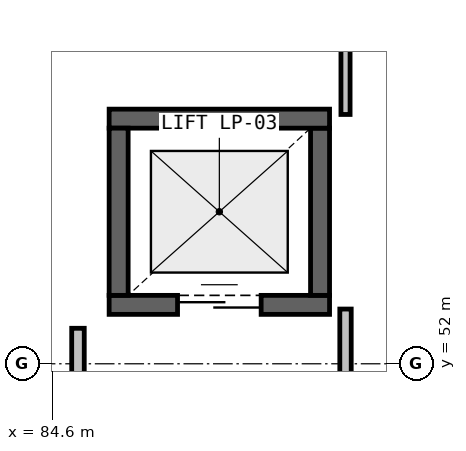
"""IFC4 building model, lengths in metres.
Left out: names, types, materials, properties, quantities, classifications, styles, units other than length and angle.
Written with IfcOpenShell. Run it as: python <this file> out.ifc"""

import sys

from ifc_helpers import new_model, si_unit, direction, frame, frame_2d, origin, place, context, subcontext, project, spatial, rectangle, extrude, element, fill, save


model = new_model("IFC4")
c1 = context("Model", 3, precision=1e-05, world=origin(), true_north=direction((0.0, 1.0)))
c2 = subcontext(c1, "Body", "Model", "MODEL_VIEW")
j1 = project(units=[si_unit("LENGTHUNIT", "METRE"), si_unit("PLANEANGLEUNIT", "RADIAN")], contexts=[c1])
p1 = place(None, origin())
s1 = spatial("IfcSite", under=j1, at=p1, CompositionType="ELEMENT")
p2 = place(p1, origin())
s2 = spatial("IfcBuilding", under=s1, at=p2, CompositionType="ELEMENT")
p3 = place(p2, frame((0.0, 0.0, 5.4)))
s3 = spatial("IfcBuildingStorey", under=s2, at=p3, CompositionType="ELEMENT", Elevation=5.4)
p4 = place(p3, frame((85.35, 52.775, 0.0), z_axis=(0.0, 0.0, 1.0), x_axis=(1.0, 0.0, 0.0)))
e1 = element("IfcWall", 1, at=p4, inside=s3, PredefinedType="SHEAR", context=c2, shape_type="SweptSolid", body=[
    extrude(rectangle(XDim=2.9, YDim=0.25, at=frame_2d((1.45, 0.0))), origin(), (0.0, 0.0, 1.0), 4.445),
])
p5 = place(p4, frame((0.9, 0.0, 0.0)))
e2 = element("IfcOpeningElement", 2, at=p5, cuts=e1, PredefinedType="OPENING", context=c2, shape_type="SweptSolid", body=[
    extrude(rectangle(XDim=1.1, YDim=2.15, at=frame_2d((0.55, 1.075))), frame((0.0, 0.135, 0.0), z_axis=(0.0, -1.0, 0.0), x_axis=(1.0, 0.0, 0.0)), (0.0, 0.0, 1.0), 0.27),
])
p6 = place(p3, frame((88.125, 52.9, 0.0), z_axis=(0.0, 0.0, 1.0), x_axis=(0.0, 1.0, 0.0)))
e3 = element("IfcWall", 3, at=p6, inside=s3, PredefinedType="SHEAR", context=c2, shape_type="SweptSolid", body=[
    extrude(rectangle(XDim=2.2, YDim=0.25, at=frame_2d((1.1, 0.0))), origin(), (0.0, 0.0, 1.0), 4.445),
])
p7 = place(p3, frame((88.25, 55.225, 0.0), z_axis=(0.0, 0.0, 1.0), x_axis=(-1.0, 0.0, 0.0)))
e4 = element("IfcWall", 4, at=p7, inside=s3, PredefinedType="SHEAR", context=c2, shape_type="SweptSolid", body=[
    extrude(rectangle(XDim=2.9, YDim=0.25, at=frame_2d((1.45, 0.0))), origin(), (0.0, 0.0, 1.0), 4.445),
])
p8 = place(p3, frame((85.475, 55.1, 0.0), z_axis=(0.0, 0.0, 1.0), x_axis=(0.0, -1.0, 0.0)))
e5 = element("IfcWall", 5, at=p8, inside=s3, PredefinedType="SHEAR", context=c2, shape_type="SweptSolid", body=[
    extrude(rectangle(XDim=2.2, YDim=0.25, at=frame_2d((1.1, 0.0))), origin(), (0.0, 0.0, 1.0), 4.445),
])
p9 = place(p3, frame((84.94, 52.467, 0.0), z_axis=(0.0, 0.0, 1.0), x_axis=(0.0, -1.0, 0.0)))
e6 = element("IfcWall", 6, at=p9, inside=s3, PredefinedType="PARTITIONING", context=c2, shape_type="SweptSolid", body=[
    extrude(rectangle(XDim=3.616, YDim=0.165, at=frame_2d((1.808, 0.0))), origin(), (0.0, 0.0, 1.0), 4.445),
])
p10 = place(p3, frame((88.46, 55.28, 0.0), z_axis=(0.0, 0.0, 1.0), x_axis=(0.0, 1.0, 0.0)))
e7 = element("IfcWall", 7, at=p10, inside=s3, PredefinedType="PARTITIONING", context=c2, shape_type="SweptSolid", body=[
    extrude(rectangle(XDim=10.755, YDim=0.12, at=frame_2d((5.377, 0.0))), origin(), (0.0, 0.0, 1.0), 4.445),
])
p11 = place(p3, frame((88.46, 47.538, 0.0), z_axis=(0.0, 0.0, 1.0), x_axis=(0.0, 1.0, 0.0)))
e8 = element("IfcWall", 8, at=p11, inside=s3, PredefinedType="PARTITIONING", context=c2, shape_type="SweptSolid", body=[
    extrude(rectangle(XDim=5.182, YDim=0.15, at=frame_2d((2.591, 0.0))), origin(), (0.0, 0.0, 1.0), 4.445),
])
p12 = place(p5, origin())
e9 = element("IfcDoor", 9, at=p12, inside=s3, OperationType="DOUBLE_DOOR_SLIDING", PredefinedType="DOOR", context=c2, shape_type="SweptSolid", body=[
    extrude(rectangle(XDim=1.1, YDim=2.15, at=frame_2d((0.55, 1.075))), frame((0.0, 0.025, 0.0), z_axis=(0.0, -1.0, 0.0), x_axis=(1.0, 0.0, 0.0)), (0.0, 0.0, 1.0), 0.05),
])
fill(e2, e9)
save(model, sys.argv[1])
